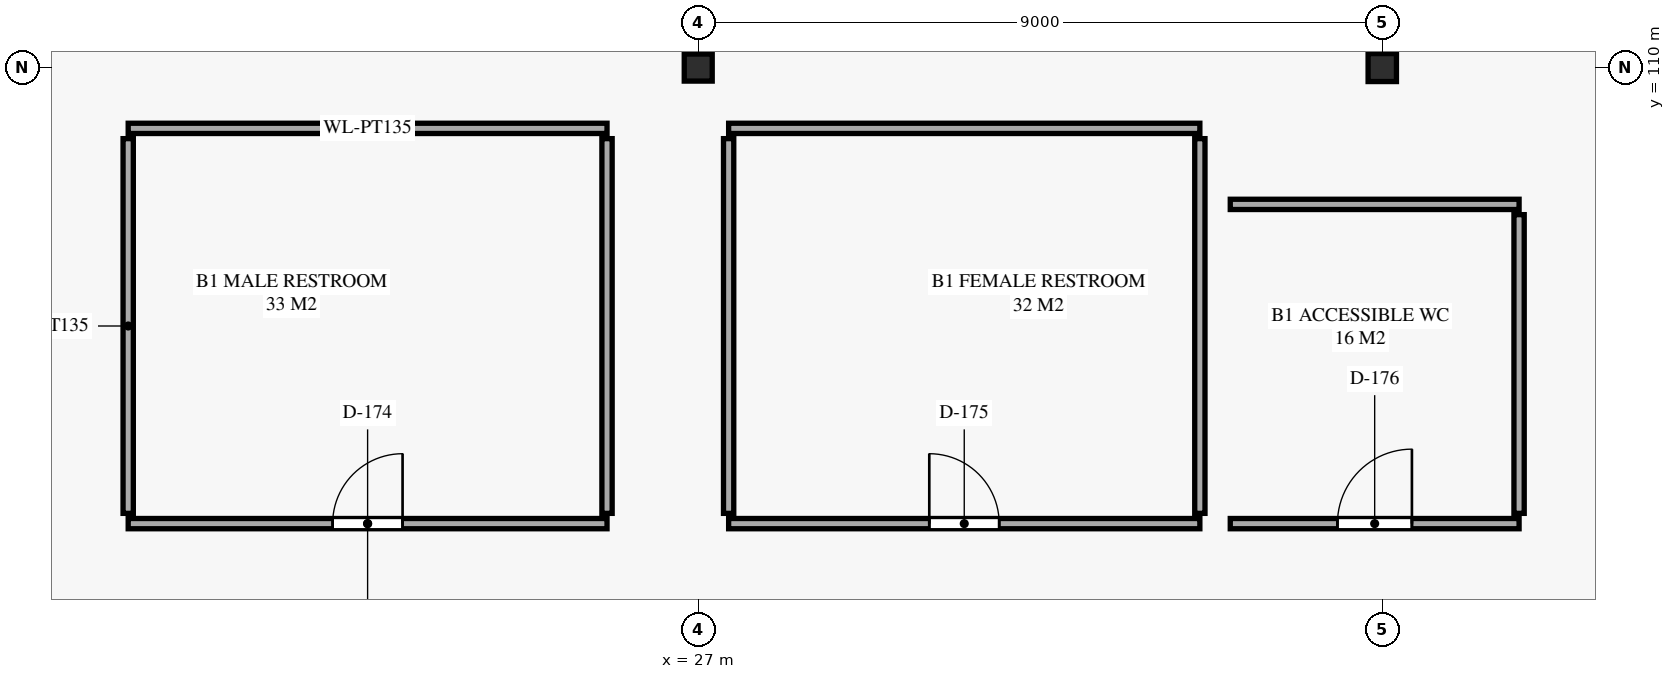
"""IFC4 building model, lengths in metres.
Left out: names, types, materials, properties, quantities, classifications, styles, units other than length and angle.
Written with IfcOpenShell. Run it as: python <this file> out.ifc"""

import sys

from ifc_helpers import new_model, si_unit, direction, frame, frame_2d, origin, origin_2d, place, context, subcontext, project, spatial, rectangle, i_section, extrude, element, fill, save


model = new_model("IFC4")
c1 = context("Model", 3, precision=1e-05, world=origin(), true_north=direction((0.0, 1.0)))
c2 = subcontext(c1, "Body", "Model", "MODEL_VIEW")
j1 = project(units=[si_unit("LENGTHUNIT", "METRE"), si_unit("PLANEANGLEUNIT", "RADIAN")], contexts=[c1])
p1 = place(None, origin())
s1 = spatial("IfcSite", under=j1, at=p1, CompositionType="ELEMENT")
p2 = place(p1, origin())
s2 = spatial("IfcBuilding", under=s1, at=p2, CompositionType="ELEMENT")
p3 = place(p2, frame((0.0, 0.0, -5.4)))
s3 = spatial("IfcBuildingStorey", under=s2, at=p3, CompositionType="ELEMENT", Elevation=-5.4)
p4 = place(p3, frame((27.0, 110.0, -0.6), z_axis=(0.0, 0.0, 1.0), x_axis=(1.0, 0.0, 0.0)))
e1 = element("IfcColumn", 1, at=p4, inside=s3, PredefinedType="COLUMN", context=c2, shape_type="SweptSolid", body=[
    extrude(i_section(OverallWidth=0.368, OverallDepth=0.356, WebThickness=0.011, FlangeThickness=0.018, FilletRadius=0.015, at=origin_2d()), origin(), (0.0, 0.0, 1.0), 6.0),
])
p5 = place(p3, frame((36.0, 110.0, -0.6), z_axis=(0.0, 0.0, 1.0), x_axis=(1.0, 0.0, 0.0)))
e2 = element("IfcColumn", 2, at=p5, inside=s3, PredefinedType="COLUMN", context=c2, shape_type="SweptSolid", body=[
    extrude(i_section(OverallWidth=0.373, OverallDepth=0.368, WebThickness=0.015, FlangeThickness=0.024, FilletRadius=0.015, at=origin_2d()), origin(), (0.0, 0.0, 1.0), 6.0),
])
p6 = place(p3, frame((19.5, 104.0, 0.0), z_axis=(0.0, 0.0, 1.0), x_axis=(1.0, 0.0, 0.0)))
e3 = element("IfcWall", 3, at=p6, inside=s3, PredefinedType="PARTITIONING", context=c2, shape_type="SweptSolid", body=[
    extrude(rectangle(XDim=6.3, YDim=0.135, at=frame_2d((3.15, 0.0))), origin(), (0.0, 0.0, 1.0), 5.05),
])
p7 = place(p6, frame((2.69, 0.0, 0.0)))
e4 = element("IfcOpeningElement", 4, at=p7, cuts=e3, PredefinedType="OPENING", context=c2, shape_type="SweptSolid", body=[
    extrude(rectangle(XDim=0.92, YDim=2.1, at=frame_2d((0.46, 1.05))), frame((0.0, 0.078, 0.0), z_axis=(0.0, -1.0, 0.0), x_axis=(1.0, 0.0, 0.0)), (0.0, 0.0, 1.0), 0.155),
])
p8 = place(p3, frame((25.8, 109.2, 0.0), z_axis=(0.0, 0.0, 1.0), x_axis=(-1.0, 0.0, 0.0)))
e5 = element("IfcWall", 5, at=p8, inside=s3, PredefinedType="PARTITIONING", context=c2, shape_type="SweptSolid", body=[
    extrude(rectangle(XDim=6.3, YDim=0.135, at=frame_2d((3.15, 0.0))), origin(), (0.0, 0.0, 1.0), 5.05),
])
for number, where, z_axis, x_axis in (
    (6, (19.5, 109.065, 0.0), (0.0, 0.0, 1.0), (0.0, -1.0, 0.0)),
    (7, (25.8, 104.135, 0.0), (0.0, 0.0, 1.0), (0.0, 1.0, 0.0)),
):
    element("IfcWall", number, at=place(p3, frame(where, z_axis=z_axis, x_axis=x_axis)), inside=s3, PredefinedType="PARTITIONING", context=c2, shape_type="SweptSolid", body=[
        extrude(rectangle(XDim=4.93, YDim=0.135, at=frame_2d((2.465, 0.0))), origin(), (0.0, 0.0, 1.0), 5.05),
    ])
p9 = place(p3, frame((27.4, 104.0, 0.0), z_axis=(0.0, 0.0, 1.0), x_axis=(1.0, 0.0, 0.0)))
e8 = element("IfcWall", 8, at=p9, inside=s3, PredefinedType="PARTITIONING", context=c2, shape_type="SweptSolid", body=[
    extrude(rectangle(XDim=6.2, YDim=0.135, at=frame_2d((3.1, 0.0))), origin(), (0.0, 0.0, 1.0), 5.05),
])
p10 = place(p9, frame((2.64, 0.0, 0.0)))
e9 = element("IfcOpeningElement", 9, at=p10, cuts=e8, PredefinedType="OPENING", context=c2, shape_type="SweptSolid", body=[
    extrude(rectangle(XDim=0.92, YDim=2.1, at=frame_2d((0.46, 1.05))), frame((0.0, 0.078, 0.0), z_axis=(0.0, -1.0, 0.0), x_axis=(1.0, 0.0, 0.0)), (0.0, 0.0, 1.0), 0.155),
])
p11 = place(p3, frame((33.6, 109.2, 0.0), z_axis=(0.0, 0.0, 1.0), x_axis=(-1.0, 0.0, 0.0)))
e10 = element("IfcWall", 10, at=p11, inside=s3, PredefinedType="PARTITIONING", context=c2, shape_type="SweptSolid", body=[
    extrude(rectangle(XDim=6.2, YDim=0.135, at=frame_2d((3.1, 0.0))), origin(), (0.0, 0.0, 1.0), 5.05),
])
p12 = place(p3, frame((27.4, 109.065, 0.0), z_axis=(0.0, 0.0, 1.0), x_axis=(0.0, -1.0, 0.0)))
e11 = element("IfcWall", 11, at=p12, inside=s3, PredefinedType="PARTITIONING", context=c2, shape_type="SweptSolid", body=[
    extrude(rectangle(XDim=4.93, YDim=0.135, at=frame_2d((2.465, 0.0))), origin(), (0.0, 0.0, 1.0), 5.05),
])
p13 = place(p3, frame((33.6, 104.135, 0.0), z_axis=(0.0, 0.0, 1.0), x_axis=(0.0, 1.0, 0.0)))
e12 = element("IfcWall", 12, at=p13, inside=s3, PredefinedType="PARTITIONING", context=c2, shape_type="SweptSolid", body=[
    extrude(rectangle(XDim=4.93, YDim=0.135, at=frame_2d((2.465, 0.0))), origin(), (0.0, 0.0, 1.0), 4.636),
])
p14 = place(p3, frame((34.0, 104.0, 0.0), z_axis=(0.0, 0.0, 1.0), x_axis=(1.0, 0.0, 0.0)))
e13 = element("IfcWall", 13, at=p14, inside=s3, PredefinedType="PARTITIONING", context=c2, shape_type="SweptSolid", body=[
    extrude(rectangle(XDim=3.8, YDim=0.135, at=frame_2d((1.9, 0.0))), origin(), (0.0, 0.0, 1.0), 5.05),
])
p15 = place(p14, frame((1.41, 0.0, 0.0)))
e14 = element("IfcOpeningElement", 14, at=p15, cuts=e13, PredefinedType="OPENING", context=c2, shape_type="SweptSolid", body=[
    extrude(rectangle(XDim=0.98, YDim=2.1, at=frame_2d((0.49, 1.05))), frame((0.0, 0.078, 0.0), z_axis=(0.0, -1.0, 0.0), x_axis=(1.0, 0.0, 0.0)), (0.0, 0.0, 1.0), 0.155),
])
p16 = place(p3, frame((37.8, 108.2, 0.0), z_axis=(0.0, 0.0, 1.0), x_axis=(-1.0, 0.0, 0.0)))
e15 = element("IfcWall", 15, at=p16, inside=s3, PredefinedType="PARTITIONING", context=c2, shape_type="SweptSolid", body=[
    extrude(rectangle(XDim=3.8, YDim=0.135, at=frame_2d((1.9, 0.0))), origin(), (0.0, 0.0, 1.0), 5.05),
])
p17 = place(p3, frame((37.8, 104.135, 0.0), z_axis=(0.0, 0.0, 1.0), x_axis=(0.0, 1.0, 0.0)))
e16 = element("IfcWall", 16, at=p17, inside=s3, PredefinedType="PARTITIONING", context=c2, shape_type="SweptSolid", body=[
    extrude(rectangle(XDim=3.93, YDim=0.135, at=frame_2d((1.965, 0.0))), origin(), (0.0, 0.0, 1.0), 5.05),
])
p18 = place(p7, origin())
e17 = element("IfcDoor", 17, at=p18, inside=s3, OperationType="SINGLE_SWING_RIGHT", PredefinedType="DOOR", context=c2, shape_type="SweptSolid", body=[
    extrude(rectangle(XDim=0.92, YDim=2.1, at=frame_2d((0.46, 1.05))), frame((0.0, 0.025, 0.0), z_axis=(0.0, -1.0, 0.0), x_axis=(1.0, 0.0, 0.0)), (0.0, 0.0, 1.0), 0.05),
])
fill(e4, e17)
p19 = place(p10, origin())
e18 = element("IfcDoor", 18, at=p19, inside=s3, OperationType="SINGLE_SWING_LEFT", PredefinedType="DOOR", context=c2, shape_type="SweptSolid", body=[
    extrude(rectangle(XDim=0.92, YDim=2.1, at=frame_2d((0.46, 1.05))), frame((0.0, 0.025, 0.0), z_axis=(0.0, -1.0, 0.0), x_axis=(1.0, 0.0, 0.0)), (0.0, 0.0, 1.0), 0.05),
])
fill(e9, e18)
p20 = place(p15, origin())
e19 = element("IfcDoor", 19, at=p20, inside=s3, OperationType="SINGLE_SWING_RIGHT", PredefinedType="DOOR", context=c2, shape_type="SweptSolid", body=[
    extrude(rectangle(XDim=0.98, YDim=2.1, at=frame_2d((0.49, 1.05))), frame((0.0, 0.025, 0.0), z_axis=(0.0, -1.0, 0.0), x_axis=(1.0, 0.0, 0.0)), (0.0, 0.0, 1.0), 0.05),
])
fill(e14, e19)
save(model, sys.argv[1])
